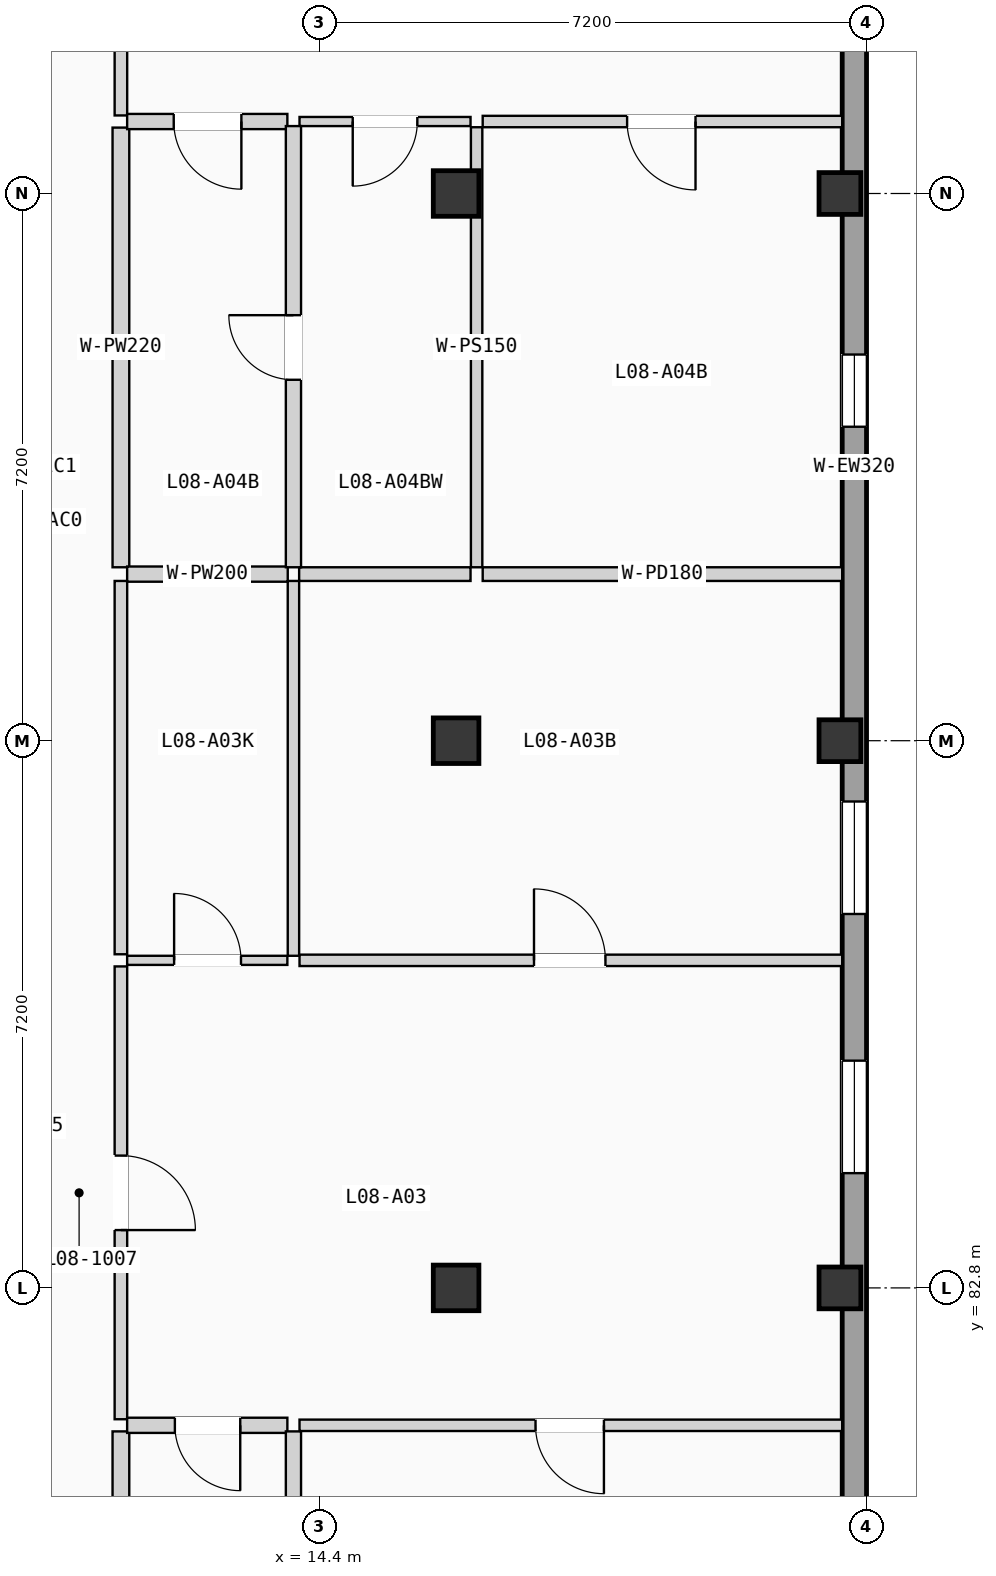
"""IFC4 building model, lengths in metres.
Left out: names, types, materials, properties, quantities, classifications, styles, units other than length and angle.
Written with IfcOpenShell. Run it as: python <this file> out.ifc"""

import sys

from ifc_helpers import new_model, si_unit, direction, frame, frame_2d, origin, origin_2d, place, context, subcontext, project, spatial, rectangle, extrude, element, fill, save


model = new_model("IFC4")
c1 = context("Model", 3, precision=1e-05, world=origin(), true_north=direction((0.0, 1.0)))
c2 = subcontext(c1, "Body", "Model", "MODEL_VIEW")
j1 = project(units=[si_unit("LENGTHUNIT", "METRE"), si_unit("PLANEANGLEUNIT", "RADIAN")], contexts=[c1])
p1 = place(None, origin())
s1 = spatial("IfcSite", under=j1, at=p1, CompositionType="ELEMENT")
p2 = place(p1, origin())
s2 = spatial("IfcBuilding", under=s1, at=p2, CompositionType="ELEMENT")
p3 = place(p2, frame((0.0, 0.0, 27.825)))
s3 = spatial("IfcBuildingStorey", under=s2, at=p3, CompositionType="ELEMENT", Elevation=27.825)
for number, where, z_axis, x_axis in (
    (1, (16.2, 82.8, 0.0), (0.0, 0.0, 1.0), (1.0, 0.0, 0.0)),
    (2, (16.2, 90.0, 0.0), (0.0, 0.0, 1.0), (1.0, 0.0, 0.0)),
    (3, (16.2, 97.2, 0.0), (0.0, 0.0, 1.0), (1.0, 0.0, 0.0)),
):
    element("IfcColumn", number, at=place(p3, frame(where, z_axis=z_axis, x_axis=x_axis)), inside=s3, PredefinedType="COLUMN", context=c2, shape_type="SweptSolid", body=[
        extrude(rectangle(XDim=0.6, YDim=0.6, at=origin_2d()), origin(), (0.0, 0.0, 1.0), 3.15),
    ])
for number, where, z_axis, x_axis in (
    (4, (21.25, 82.8, 0.0), (0.0, 0.0, 1.0), (1.0, 0.0, 0.0)),
    (5, (21.25, 90.0, 0.0), (0.0, 0.0, 1.0), (1.0, 0.0, 0.0)),
    (6, (21.25, 97.2, 0.0), (0.0, 0.0, 1.0), (1.0, 0.0, 0.0)),
):
    element("IfcColumn", number, at=place(p3, frame(where, z_axis=z_axis, x_axis=x_axis)), inside=s3, PredefinedType="COLUMN", context=c2, shape_type="SweptSolid", body=[
        extrude(rectangle(XDim=0.55, YDim=0.55, at=origin_2d()), origin(), (0.0, 0.0, 1.0), 3.15),
    ])
p4 = place(p3, frame((21.44, 68.72, 0.0), z_axis=(0.0, 0.0, 1.0), x_axis=(0.0, 1.0, 0.0)))
e7 = element("IfcWall", 7, at=p4, inside=s3, PredefinedType="SOLIDWALL", context=c2, shape_type="SweptSolid", body=[
    extrude(rectangle(XDim=49.76, YDim=0.32, at=frame_2d((24.88, 0.0))), origin(), (0.0, 0.0, 1.0), 2.89),
])
p5 = place(p4, frame((15.59, 0.0, 0.9)))
e8 = element("IfcOpeningElement", 8, at=p5, cuts=e7, PredefinedType="OPENING", context=c2, shape_type="SweptSolid", body=[
    extrude(rectangle(XDim=1.48, YDim=1.2, at=frame_2d((0.74, 0.6))), frame((0.0, 0.17, 0.0), z_axis=(0.0, -1.0, 0.0), x_axis=(1.0, 0.0, 0.0)), (0.0, 0.0, 1.0), 0.34),
])
p6 = place(p4, frame((8.996, 0.0, 0.855)))
e9 = element("IfcOpeningElement", 9, at=p6, cuts=e7, PredefinedType="OPENING", context=c2, shape_type="SweptSolid", body=[
    extrude(rectangle(XDim=1.48, YDim=1.35, at=frame_2d((0.74, 0.675))), frame((0.0, 0.17, 0.0), z_axis=(0.0, -1.0, 0.0), x_axis=(1.0, 0.0, 0.0)), (0.0, 0.0, 1.0), 0.34),
])
p7 = place(p4, frame((19.0, 0.0, 0.705)))
e10 = element("IfcOpeningElement", 10, at=p7, cuts=e7, PredefinedType="OPENING", context=c2, shape_type="SweptSolid", body=[
    extrude(rectangle(XDim=1.48, YDim=1.5, at=frame_2d((0.74, 0.75))), frame((0.0, 0.17, 0.0), z_axis=(0.0, -1.0, 0.0), x_axis=(1.0, 0.0, 0.0)), (0.0, 0.0, 1.0), 0.34),
])
p8 = place(p4, frame((31.719, 0.0, 0.555)))
e11 = element("IfcOpeningElement", 11, at=p8, cuts=e7, PredefinedType="OPENING", context=c2, shape_type="SweptSolid", body=[
    extrude(rectangle(XDim=1.48, YDim=1.65, at=frame_2d((0.74, 0.825))), frame((0.0, 0.17, 0.0), z_axis=(0.0, -1.0, 0.0), x_axis=(1.0, 0.0, 0.0)), (0.0, 0.0, 1.0), 0.34),
])
p9 = place(p4, frame((25.411, 0.0, 0.85)))
e12 = element("IfcOpeningElement", 12, at=p9, cuts=e7, PredefinedType="OPENING", context=c2, shape_type="SweptSolid", body=[
    extrude(rectangle(XDim=0.95, YDim=1.2, at=frame_2d((0.475, 0.6))), frame((0.0, 0.17, 0.0), z_axis=(0.0, -1.0, 0.0), x_axis=(1.0, 0.0, 0.0)), (0.0, 0.0, 1.0), 0.34),
])
p10 = place(p4, frame((38.788, 0.0, 0.9)))
e13 = element("IfcOpeningElement", 13, at=p10, cuts=e7, PredefinedType="OPENING", context=c2, shape_type="SweptSolid", body=[
    extrude(rectangle(XDim=1.6, YDim=1.2, at=frame_2d((0.8, 0.6))), frame((0.0, 0.17, 0.0), z_axis=(0.0, -1.0, 0.0), x_axis=(1.0, 0.0, 0.0)), (0.0, 0.0, 1.0), 0.34),
])
p11 = place(p3, frame((11.79, 81.072, 0.0), z_axis=(0.0, 0.0, 1.0), x_axis=(0.0, 1.0, 0.0)))
e14 = element("IfcWall", 14, at=p11, inside=s3, PredefinedType="PARTITIONING", context=c2, shape_type="SweptSolid", body=[
    extrude(rectangle(XDim=5.958, YDim=0.165, at=frame_2d((2.979, 0.0))), origin(), (0.0, 0.0, 1.0), 2.87),
])
p12 = place(p11, frame((2.489, 0.0, 0.0)))
e15 = element("IfcOpeningElement", 15, at=p12, cuts=e14, PredefinedType="OPENING", context=c2, shape_type="SweptSolid", body=[
    extrude(rectangle(XDim=0.98, YDim=2.08, at=frame_2d((0.49, 1.04))), frame((0.0, 0.093, 0.0), z_axis=(0.0, -1.0, 0.0), x_axis=(1.0, 0.0, 0.0)), (0.0, 0.0, 1.0), 0.185),
])
p13 = place(p3, frame((11.79, 75.975, 0.0), z_axis=(0.0, 0.0, 1.0), x_axis=(0.0, 1.0, 0.0)))
e16 = element("IfcWall", 16, at=p13, inside=s3, PredefinedType="PLUMBINGWALL", context=c2, shape_type="SweptSolid", body=[
    extrude(rectangle(XDim=4.937, YDim=0.22, at=frame_2d((2.469, 0.0))), origin(), (0.0, 0.0, 1.0), 2.87),
])
p14 = place(p3, frame((11.79, 87.19, 0.0), z_axis=(0.0, 0.0, 1.0), x_axis=(0.0, 1.0, 0.0)))
e17 = element("IfcWall", 17, at=p14, inside=s3, PredefinedType="PARTITIONING", context=c2, shape_type="SweptSolid", body=[
    extrude(rectangle(XDim=4.912, YDim=0.165, at=frame_2d((2.456, 0.0))), origin(), (0.0, 0.0, 1.0), 2.87),
])
p15 = place(p3, frame((11.79, 98.227, 0.0), z_axis=(0.0, 0.0, 1.0), x_axis=(0.0, 1.0, 0.0)))
e18 = element("IfcWall", 18, at=p15, inside=s3, PredefinedType="PARTITIONING", context=c2, shape_type="SweptSolid", body=[
    extrude(rectangle(XDim=7.028, YDim=0.165, at=frame_2d((3.514, 0.0))), origin(), (0.0, 0.0, 1.0), 2.87),
])
p16 = place(p15, frame((3.024, 0.0, 0.0)))
e19 = element("IfcOpeningElement", 19, at=p16, cuts=e18, PredefinedType="OPENING", context=c2, shape_type="SweptSolid", body=[
    extrude(rectangle(XDim=0.98, YDim=2.08, at=frame_2d((0.49, 1.04))), frame((0.0, 0.093, 0.0), z_axis=(0.0, -1.0, 0.0), x_axis=(1.0, 0.0, 0.0)), (0.0, 0.0, 1.0), 0.185),
])
p17 = place(p3, frame((11.79, 92.282, 0.0), z_axis=(0.0, 0.0, 1.0), x_axis=(0.0, 1.0, 0.0)))
e20 = element("IfcWall", 20, at=p17, inside=s3, PredefinedType="PLUMBINGWALL", context=c2, shape_type="SweptSolid", body=[
    extrude(rectangle(XDim=5.785, YDim=0.22, at=frame_2d((2.893, 0.0))), origin(), (0.0, 0.0, 1.0), 2.87),
])
p18 = place(p3, frame((11.872, 80.992, 0.0), z_axis=(0.0, 0.0, 1.0), x_axis=(1.0, 0.0, 0.0)))
e21 = element("IfcWall", 21, at=p18, inside=s3, PredefinedType="PLUMBINGWALL", context=c2, shape_type="SweptSolid", body=[
    extrude(rectangle(XDim=2.108, YDim=0.2, at=frame_2d((1.054, 0.0))), origin(), (0.0, 0.0, 1.0), 2.87),
])
p19 = place(p18, frame((0.628, 0.0, 0.0)))
e22 = element("IfcOpeningElement", 22, at=p19, cuts=e21, PredefinedType="OPENING", context=c2, shape_type="SweptSolid", body=[
    extrude(rectangle(XDim=0.86, YDim=2.0, at=frame_2d((0.43, 1.0))), frame((0.0, 0.11, 0.0), z_axis=(0.0, -1.0, 0.0), x_axis=(1.0, 0.0, 0.0)), (0.0, 0.0, 1.0), 0.22),
])
p20 = place(p3, frame((11.872, 87.11, 0.0), z_axis=(0.0, 0.0, 1.0), x_axis=(1.0, 0.0, 0.0)))
e23 = element("IfcWall", 23, at=p20, inside=s3, PredefinedType="PARTITIONING", context=c2, shape_type="SweptSolid", body=[
    extrude(rectangle(XDim=2.108, YDim=0.12, at=frame_2d((1.054, 0.0))), origin(), (0.0, 0.0, 1.0), 2.87),
])
p21 = place(p20, frame((0.618, 0.0, 0.0)))
e24 = element("IfcOpeningElement", 24, at=p21, cuts=e23, PredefinedType="OPENING", context=c2, shape_type="SweptSolid", body=[
    extrude(rectangle(XDim=0.88, YDim=2.02, at=frame_2d((0.44, 1.01))), frame((0.0, 0.07, 0.0), z_axis=(0.0, -1.0, 0.0), x_axis=(1.0, 0.0, 0.0)), (0.0, 0.0, 1.0), 0.14),
])
p22 = place(p3, frame((14.14, 80.992, 0.0), z_axis=(0.0, 0.0, 1.0), x_axis=(1.0, 0.0, 0.0)))
e25 = element("IfcWall", 25, at=p22, inside=s3, PredefinedType="PARTITIONING", context=c2, shape_type="SweptSolid", body=[
    extrude(rectangle(XDim=7.14, YDim=0.15, at=frame_2d((3.57, 0.0))), origin(), (0.0, 0.0, 1.0), 2.87),
])
p23 = place(p22, frame((3.105, 0.0, 0.0)))
e26 = element("IfcOpeningElement", 26, at=p23, cuts=e25, PredefinedType="OPENING", context=c2, shape_type="SweptSolid", body=[
    extrude(rectangle(XDim=0.9, YDim=2.04, at=frame_2d((0.45, 1.02))), frame((0.0, 0.085, 0.0), z_axis=(0.0, -1.0, 0.0), x_axis=(1.0, 0.0, 0.0)), (0.0, 0.0, 1.0), 0.17),
])
p24 = place(p3, frame((14.14, 87.11, 0.0), z_axis=(0.0, 0.0, 1.0), x_axis=(1.0, 0.0, 0.0)))
e27 = element("IfcWall", 27, at=p24, inside=s3, PredefinedType="PARTITIONING", context=c2, shape_type="SweptSolid", body=[
    extrude(rectangle(XDim=7.14, YDim=0.15, at=frame_2d((3.57, 0.0))), origin(), (0.0, 0.0, 1.0), 2.87),
])
p25 = place(p24, frame((3.085, 0.0, 0.0)))
e28 = element("IfcOpeningElement", 28, at=p25, cuts=e27, PredefinedType="OPENING", context=c2, shape_type="SweptSolid", body=[
    extrude(rectangle(XDim=0.94, YDim=2.06, at=frame_2d((0.47, 1.03))), frame((0.0, 0.085, 0.0), z_axis=(0.0, -1.0, 0.0), x_axis=(1.0, 0.0, 0.0)), (0.0, 0.0, 1.0), 0.17),
])
p26 = place(p3, frame((14.06, 75.975, 0.0), z_axis=(0.0, 0.0, 1.0), x_axis=(0.0, 1.0, 0.0)))
e29 = element("IfcWall", 29, at=p26, inside=s3, PredefinedType="PLUMBINGWALL", context=c2, shape_type="SweptSolid", body=[
    extrude(rectangle(XDim=4.937, YDim=0.2, at=frame_2d((2.469, 0.0))), origin(), (0.0, 0.0, 1.0), 2.87),
])
p27 = place(p3, frame((14.06, 87.17, 0.0), z_axis=(0.0, 0.0, 1.0), x_axis=(0.0, 1.0, 0.0)))
e30 = element("IfcWall", 30, at=p27, inside=s3, PredefinedType="PARTITIONING", context=c2, shape_type="SweptSolid", body=[
    extrude(rectangle(XDim=4.932, YDim=0.15, at=frame_2d((2.466, 0.0))), origin(), (0.0, 0.0, 1.0), 2.87),
])
p28 = place(p3, frame((11.872, 92.192, 0.0), z_axis=(0.0, 0.0, 1.0), x_axis=(1.0, 0.0, 0.0)))
e31 = element("IfcWall", 31, at=p28, inside=s3, PredefinedType="PLUMBINGWALL", context=c2, shape_type="SweptSolid", body=[
    extrude(rectangle(XDim=2.113, YDim=0.2, at=frame_2d((1.057, 0.0))), origin(), (0.0, 0.0, 1.0), 2.87),
])
p29 = place(p3, frame((16.55, 92.192, 0.0), z_axis=(0.0, 0.0, 1.0), x_axis=(1.0, 0.0, 0.0)))
e32 = element("IfcWall", 32, at=p29, inside=s3, PredefinedType="PARTITIONING", context=c2, shape_type="SweptSolid", body=[
    extrude(rectangle(XDim=4.73, YDim=0.18, at=frame_2d((2.365, 0.0))), origin(), (0.0, 0.0, 1.0), 2.87),
])
p30 = place(p3, frame((14.135, 92.192, 0.0), z_axis=(0.0, 0.0, 1.0), x_axis=(1.0, 0.0, 0.0)))
e33 = element("IfcWall", 33, at=p30, inside=s3, PredefinedType="PARTITIONING", context=c2, shape_type="SweptSolid", body=[
    extrude(rectangle(XDim=2.255, YDim=0.18, at=frame_2d((1.127, 0.0))), origin(), (0.0, 0.0, 1.0), 2.87),
])
p31 = place(p3, frame((11.872, 98.147, 0.0), z_axis=(0.0, 0.0, 1.0), x_axis=(1.0, 0.0, 0.0)))
e34 = element("IfcWall", 34, at=p31, inside=s3, PredefinedType="PLUMBINGWALL", context=c2, shape_type="SweptSolid", body=[
    extrude(rectangle(XDim=2.108, YDim=0.2, at=frame_2d((1.054, 0.0))), origin(), (0.0, 0.0, 1.0), 2.87),
])
p32 = place(p31, frame((0.613, 0.0, 0.0)))
e35 = element("IfcOpeningElement", 35, at=p32, cuts=e34, PredefinedType="OPENING", context=c2, shape_type="SweptSolid", body=[
    extrude(rectangle(XDim=0.89, YDim=2.03, at=frame_2d((0.445, 1.015))), frame((0.0, 0.11, 0.0), z_axis=(0.0, -1.0, 0.0), x_axis=(1.0, 0.0, 0.0)), (0.0, 0.0, 1.0), 0.22),
])
p33 = place(p3, frame((16.55, 98.147, 0.0), z_axis=(0.0, 0.0, 1.0), x_axis=(1.0, 0.0, 0.0)))
e36 = element("IfcWall", 36, at=p33, inside=s3, PredefinedType="PARTITIONING", context=c2, shape_type="SweptSolid", body=[
    extrude(rectangle(XDim=4.73, YDim=0.15, at=frame_2d((2.365, 0.0))), origin(), (0.0, 0.0, 1.0), 2.87),
])
p34 = place(p33, frame((1.9, 0.0, 0.0)))
e37 = element("IfcOpeningElement", 37, at=p34, cuts=e36, PredefinedType="OPENING", context=c2, shape_type="SweptSolid", body=[
    extrude(rectangle(XDim=0.9, YDim=2.04, at=frame_2d((0.45, 1.02))), frame((0.0, 0.085, 0.0), z_axis=(0.0, -1.0, 0.0), x_axis=(1.0, 0.0, 0.0)), (0.0, 0.0, 1.0), 0.17),
])
p35 = place(p3, frame((14.14, 98.147, 0.0), z_axis=(0.0, 0.0, 1.0), x_axis=(1.0, 0.0, 0.0)))
e38 = element("IfcWall", 38, at=p35, inside=s3, PredefinedType="PARTITIONING", context=c2, shape_type="SweptSolid", body=[
    extrude(rectangle(XDim=2.25, YDim=0.12, at=frame_2d((1.125, 0.0))), origin(), (0.0, 0.0, 1.0), 2.87),
])
p36 = place(p35, frame((0.7, 0.0, 0.0)))
e39 = element("IfcOpeningElement", 39, at=p36, cuts=e38, PredefinedType="OPENING", context=c2, shape_type="SweptSolid", body=[
    extrude(rectangle(XDim=0.85, YDim=2.01, at=frame_2d((0.425, 1.005))), frame((0.0, 0.07, 0.0), z_axis=(0.0, -1.0, 0.0), x_axis=(1.0, 0.0, 0.0)), (0.0, 0.0, 1.0), 0.14),
])
p37 = place(p3, frame((14.06, 92.282, 0.0), z_axis=(0.0, 0.0, 1.0), x_axis=(0.0, 1.0, 0.0)))
e40 = element("IfcWall", 40, at=p37, inside=s3, PredefinedType="PLUMBINGWALL", context=c2, shape_type="SweptSolid", body=[
    extrude(rectangle(XDim=5.805, YDim=0.2, at=frame_2d((2.902, 0.0))), origin(), (0.0, 0.0, 1.0), 2.87),
])
p38 = place(p37, frame((2.467, 0.0, 0.0)))
e41 = element("IfcOpeningElement", 41, at=p38, cuts=e40, PredefinedType="OPENING", context=c2, shape_type="SweptSolid", body=[
    extrude(rectangle(XDim=0.85, YDim=2.01, at=frame_2d((0.425, 1.005))), frame((0.0, 0.11, 0.0), z_axis=(0.0, -1.0, 0.0), x_axis=(1.0, 0.0, 0.0)), (0.0, 0.0, 1.0), 0.22),
])
p39 = place(p3, frame((16.47, 92.282, 0.0), z_axis=(0.0, 0.0, 1.0), x_axis=(0.0, 1.0, 0.0)))
e42 = element("IfcWall", 42, at=p39, inside=s3, PredefinedType="PARTITIONING", context=c2, shape_type="SweptSolid", body=[
    extrude(rectangle(XDim=5.79, YDim=0.15, at=frame_2d((2.895, 0.0))), origin(), (0.0, 0.0, 1.0), 2.87),
])
p40 = place(p5, origin())
e43 = element("IfcWindow", 43, at=p40, inside=s3, PartitioningType="SINGLE_PANEL", PredefinedType="WINDOW", context=c2, shape_type="SweptSolid", body=[
    extrude(rectangle(XDim=1.48, YDim=1.2, at=frame_2d((0.74, 0.6))), frame((0.0, 0.03, 0.0), z_axis=(0.0, -1.0, 0.0), x_axis=(1.0, 0.0, 0.0)), (0.0, 0.0, 1.0), 0.06),
])
fill(e8, e43)
p41 = place(p7, origin())
e44 = element("IfcWindow", 44, at=p41, inside=s3, PartitioningType="SINGLE_PANEL", PredefinedType="WINDOW", context=c2, shape_type="SweptSolid", body=[
    extrude(rectangle(XDim=1.48, YDim=1.5, at=frame_2d((0.74, 0.75))), frame((0.0, 0.03, 0.0), z_axis=(0.0, -1.0, 0.0), x_axis=(1.0, 0.0, 0.0)), (0.0, 0.0, 1.0), 0.06),
])
fill(e10, e44)
p42 = place(p9, origin())
e45 = element("IfcWindow", 45, at=p42, inside=s3, PartitioningType="SINGLE_PANEL", PredefinedType="WINDOW", context=c2, shape_type="SweptSolid", body=[
    extrude(rectangle(XDim=0.95, YDim=1.2, at=frame_2d((0.475, 0.6))), frame((0.0, 0.03, 0.0), z_axis=(0.0, -1.0, 0.0), x_axis=(1.0, 0.0, 0.0)), (0.0, 0.0, 1.0), 0.06),
])
fill(e12, e45)
p43 = place(p12, frame((0.98, 0.0, 0.0), z_axis=(0.0, 0.0, 1.0), x_axis=(-1.0, 0.0, 0.0)))
e46 = element("IfcDoor", 46, at=p43, inside=s3, OperationType="SINGLE_SWING_LEFT", PredefinedType="DOOR", context=c2, shape_type="SweptSolid", body=[
    extrude(rectangle(XDim=0.98, YDim=2.08, at=frame_2d((0.49, 1.04))), frame((0.0, 0.025, 0.0), z_axis=(0.0, -1.0, 0.0), x_axis=(1.0, 0.0, 0.0)), (0.0, 0.0, 1.0), 0.05),
])
fill(e15, e46)
p44 = place(p19, frame((0.86, 0.0, 0.0), z_axis=(0.0, 0.0, 1.0), x_axis=(-1.0, 0.0, 0.0)))
e47 = element("IfcDoor", 47, at=p44, inside=s3, OperationType="SINGLE_SWING_RIGHT", PredefinedType="DOOR", context=c2, shape_type="SweptSolid", body=[
    extrude(rectangle(XDim=0.86, YDim=2.0, at=frame_2d((0.43, 1.0))), frame((0.0, 0.025, 0.0), z_axis=(0.0, -1.0, 0.0), x_axis=(1.0, 0.0, 0.0)), (0.0, 0.0, 1.0), 0.05),
])
fill(e22, e47)
p45 = place(p21, origin())
e48 = element("IfcDoor", 48, at=p45, inside=s3, OperationType="SINGLE_SWING_LEFT", PredefinedType="DOOR", context=c2, shape_type="SweptSolid", body=[
    extrude(rectangle(XDim=0.88, YDim=2.02, at=frame_2d((0.44, 1.01))), frame((0.0, 0.025, 0.0), z_axis=(0.0, -1.0, 0.0), x_axis=(1.0, 0.0, 0.0)), (0.0, 0.0, 1.0), 0.05),
])
fill(e24, e48)
p46 = place(p23, frame((0.9, 0.0, 0.0), z_axis=(0.0, 0.0, 1.0), x_axis=(-1.0, 0.0, 0.0)))
e49 = element("IfcDoor", 49, at=p46, inside=s3, OperationType="SINGLE_SWING_RIGHT", PredefinedType="DOOR", context=c2, shape_type="SweptSolid", body=[
    extrude(rectangle(XDim=0.9, YDim=2.04, at=frame_2d((0.45, 1.02))), frame((0.0, 0.025, 0.0), z_axis=(0.0, -1.0, 0.0), x_axis=(1.0, 0.0, 0.0)), (0.0, 0.0, 1.0), 0.05),
])
fill(e26, e49)
p47 = place(p25, origin())
e50 = element("IfcDoor", 50, at=p47, inside=s3, OperationType="SINGLE_SWING_LEFT", PredefinedType="DOOR", context=c2, shape_type="SweptSolid", body=[
    extrude(rectangle(XDim=0.94, YDim=2.06, at=frame_2d((0.47, 1.03))), frame((0.0, 0.025, 0.0), z_axis=(0.0, -1.0, 0.0), x_axis=(1.0, 0.0, 0.0)), (0.0, 0.0, 1.0), 0.05),
])
fill(e28, e50)
p48 = place(p32, frame((0.89, 0.0, 0.0), z_axis=(0.0, 0.0, 1.0), x_axis=(-1.0, 0.0, 0.0)))
e51 = element("IfcDoor", 51, at=p48, inside=s3, OperationType="SINGLE_SWING_RIGHT", PredefinedType="DOOR", context=c2, shape_type="SweptSolid", body=[
    extrude(rectangle(XDim=0.89, YDim=2.03, at=frame_2d((0.445, 1.015))), frame((0.0, 0.025, 0.0), z_axis=(0.0, -1.0, 0.0), x_axis=(1.0, 0.0, 0.0)), (0.0, 0.0, 1.0), 0.05),
])
fill(e35, e51)
p49 = place(p34, frame((0.9, 0.0, 0.0), z_axis=(0.0, 0.0, 1.0), x_axis=(-1.0, 0.0, 0.0)))
e52 = element("IfcDoor", 52, at=p49, inside=s3, OperationType="SINGLE_SWING_RIGHT", PredefinedType="DOOR", context=c2, shape_type="SweptSolid", body=[
    extrude(rectangle(XDim=0.9, YDim=2.04, at=frame_2d((0.45, 1.02))), frame((0.0, 0.025, 0.0), z_axis=(0.0, -1.0, 0.0), x_axis=(1.0, 0.0, 0.0)), (0.0, 0.0, 1.0), 0.05),
])
fill(e37, e52)
p50 = place(p36, frame((0.85, 0.0, 0.0), z_axis=(0.0, 0.0, 1.0), x_axis=(-1.0, 0.0, 0.0)))
e53 = element("IfcDoor", 53, at=p50, inside=s3, OperationType="SINGLE_SWING_LEFT", PredefinedType="DOOR", context=c2, shape_type="SweptSolid", body=[
    extrude(rectangle(XDim=0.85, YDim=2.01, at=frame_2d((0.425, 1.005))), frame((0.0, 0.025, 0.0), z_axis=(0.0, -1.0, 0.0), x_axis=(1.0, 0.0, 0.0)), (0.0, 0.0, 1.0), 0.05),
])
fill(e39, e53)
p51 = place(p38, origin())
e54 = element("IfcDoor", 54, at=p51, inside=s3, OperationType="SINGLE_SWING_RIGHT", PredefinedType="DOOR", context=c2, shape_type="SweptSolid", body=[
    extrude(rectangle(XDim=0.85, YDim=2.01, at=frame_2d((0.425, 1.005))), frame((0.0, 0.025, 0.0), z_axis=(0.0, -1.0, 0.0), x_axis=(1.0, 0.0, 0.0)), (0.0, 0.0, 1.0), 0.05),
])
fill(e41, e54)
save(model, sys.argv[1])
